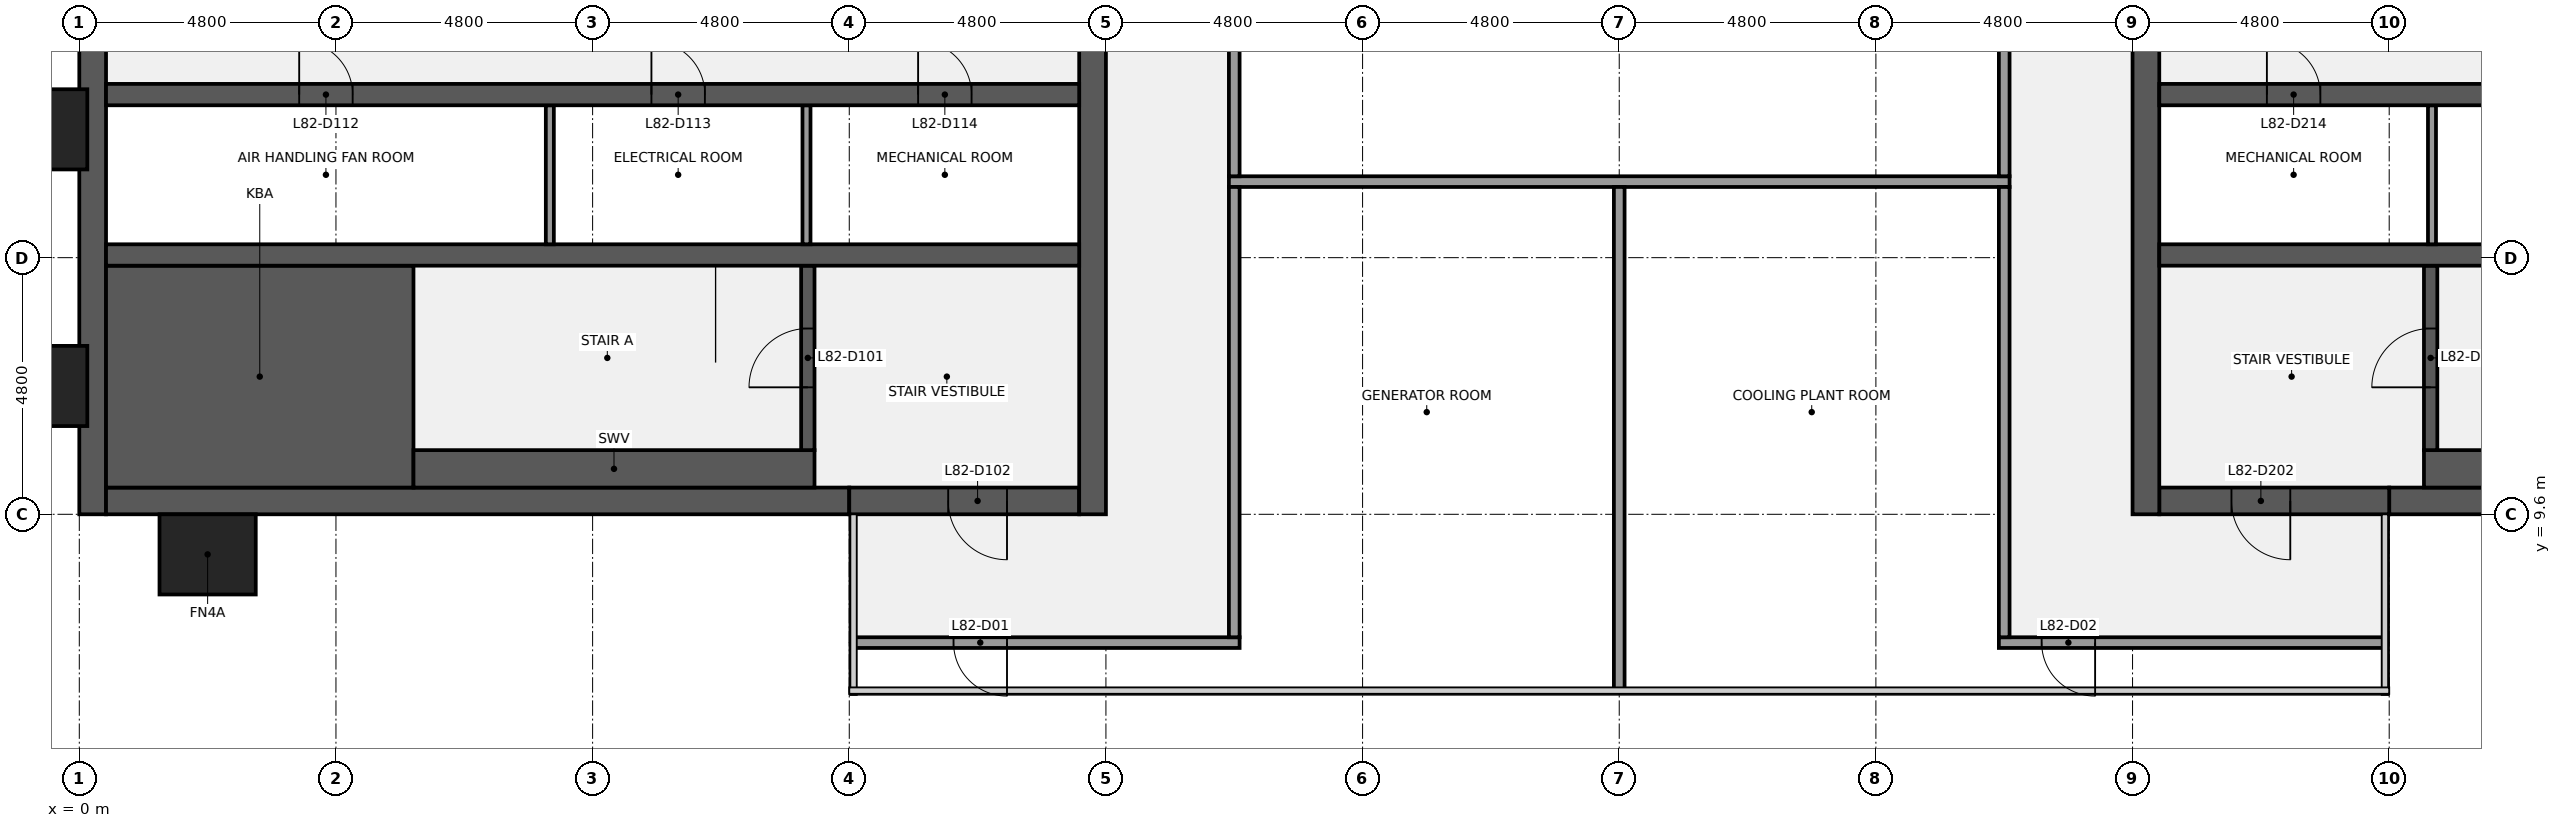
"""IFC4 building model, lengths in metres.
Left out: names, types, materials, properties, quantities, classifications, styles, units other than length and angle.
Written with IfcOpenShell. Run it as: python <this file> out.ifc"""

import sys

from ifc_helpers import new_model, si_unit, direction, frame, frame_2d, origin, origin_2d, place, context, subcontext, project, spatial, rectangle, extrude, element, fill, save


model = new_model("IFC4")
c1 = context("Model", 3, precision=1e-05, world=origin(), true_north=direction((0.0, 1.0)))
c2 = subcontext(c1, "Body", "Model", "MODEL_VIEW")
j1 = project(units=[si_unit("LENGTHUNIT", "METRE"), si_unit("PLANEANGLEUNIT", "RADIAN")], contexts=[c1])
p1 = place(None, origin())
s1 = spatial("IfcSite", under=j1, at=p1, CompositionType="ELEMENT")
p2 = place(p1, origin())
s2 = spatial("IfcBuilding", under=s1, at=p2, CompositionType="ELEMENT")
p3 = place(p2, frame((0.0, 0.0, 366.3)))
s3 = spatial("IfcBuildingStorey", under=s2, at=p3, CompositionType="ELEMENT", Elevation=366.3)
p4 = place(p3, frame((0.25, 9.6, 0.0), z_axis=(0.0, 0.0, 1.0), x_axis=(0.0, 1.0, 0.0)))
e1 = element("IfcWall", 1, at=p4, inside=s3, PredefinedType="SHEAR", context=c2, shape_type="SweptSolid", body=[
    extrude(rectangle(XDim=28.8, YDim=0.5, at=frame_2d((14.4, 0.0))), origin(), (0.0, 0.0, 1.0), 3.75),
])
p5 = place(p3, frame((14.4, 9.85, 0.0), z_axis=(0.0, 0.0, 1.0), x_axis=(-1.0, 0.0, 0.0)))
e2 = element("IfcWall", 2, at=p5, inside=s3, PredefinedType="SHEAR", context=c2, shape_type="SweptSolid", body=[
    extrude(rectangle(XDim=13.9, YDim=0.5, at=frame_2d((6.95, 0.0))), origin(), (0.0, 0.0, 1.0), 3.75),
])
p6 = place(p3, frame((18.7, 9.85, 0.0), z_axis=(0.0, 0.0, 1.0), x_axis=(-1.0, 0.0, 0.0)))
e3 = element("IfcWall", 3, at=p6, inside=s3, PredefinedType="SHEAR", context=c2, shape_type="SweptSolid", body=[
    extrude(rectangle(XDim=4.3, YDim=0.5, at=frame_2d((2.15, 0.0))), origin(), (0.0, 0.0, 1.0), 3.75),
])
p7 = place(p6, frame((1.35, 0.0, 0.0)))
e4 = element("IfcOpeningElement", 4, at=p7, cuts=e3, PredefinedType="OPENING", context=c2, shape_type="SweptSolid", body=[
    extrude(rectangle(XDim=1.1, YDim=2.1, at=frame_2d((0.55, 1.05))), frame((0.0, 0.26, 0.0), z_axis=(0.0, -1.0, 0.0), x_axis=(1.0, 0.0, 0.0)), (0.0, 0.0, 1.0), 0.52),
])
p8 = place(p3, frame((18.95, 38.4, 0.0), z_axis=(0.0, 0.0, 1.0), x_axis=(0.0, -1.0, 0.0)))
e5 = element("IfcWall", 5, at=p8, inside=s3, PredefinedType="SHEAR", context=c2, shape_type="SweptSolid", body=[
    extrude(rectangle(XDim=28.8, YDim=0.5, at=frame_2d((14.4, 0.0))), origin(), (0.0, 0.0, 1.0), 3.75),
])
p9 = place(p8, frame((18.3, 0.0, 0.0)))
e6 = element("IfcOpeningElement", 6, at=p9, cuts=e5, PredefinedType="OPENING", context=c2, shape_type="SweptSolid", body=[
    extrude(rectangle(XDim=1.8, YDim=2.1, at=frame_2d((0.9, 1.05))), frame((0.0, 0.26, 0.0), z_axis=(0.0, -1.0, 0.0), x_axis=(1.0, 0.0, 0.0)), (0.0, 0.0, 1.0), 0.52),
])
p10 = place(p8, frame((8.7, 0.0, 0.0)))
e7 = element("IfcOpeningElement", 7, at=p10, cuts=e5, PredefinedType="OPENING", context=c2, shape_type="SweptSolid", body=[
    extrude(rectangle(XDim=1.8, YDim=2.1, at=frame_2d((0.9, 1.05))), frame((0.0, 0.26, 0.0), z_axis=(0.0, -1.0, 0.0), x_axis=(1.0, 0.0, 0.0)), (0.0, 0.0, 1.0), 0.52),
])
p11 = place(p3, frame((0.5, 12.175, 0.0), z_axis=(0.0, 0.0, 1.0), x_axis=(1.0, 0.0, 0.0)))
e8 = element("IfcWall", 8, at=p11, inside=s3, PredefinedType="SHEAR", context=c2, shape_type="SweptSolid", body=[
    extrude(rectangle(XDim=5.75, YDim=4.15, at=frame_2d((2.875, 0.0))), origin(), (0.0, 0.0, 1.0), 3.75),
])
p12 = place(p3, frame((6.25, 10.45, 0.0), z_axis=(0.0, 0.0, 1.0), x_axis=(1.0, 0.0, 0.0)))
e9 = element("IfcWall", 9, at=p12, inside=s3, PredefinedType="SHEAR", context=c2, shape_type="SweptSolid", body=[
    extrude(rectangle(XDim=7.5, YDim=0.7, at=frame_2d((3.75, 0.0))), origin(), (0.0, 0.0, 1.0), 3.75),
])
p13 = place(p3, frame((13.625, 10.8, 0.0), z_axis=(0.0, 0.0, 1.0), x_axis=(0.0, 1.0, 0.0)))
e10 = element("IfcWall", 10, at=p13, inside=s3, PredefinedType="SHEAR", context=c2, shape_type="SweptSolid", body=[
    extrude(rectangle(XDim=3.45, YDim=0.25, at=frame_2d((1.725, 0.0))), origin(), (0.0, 0.0, 1.0), 3.75),
])
p14 = place(p13, frame((1.175, 0.0, 0.0)))
e11 = element("IfcOpeningElement", 11, at=p14, cuts=e10, PredefinedType="OPENING", context=c2, shape_type="SweptSolid", body=[
    extrude(rectangle(XDim=1.1, YDim=2.1, at=frame_2d((0.55, 1.05))), frame((0.0, 0.135, 0.0), z_axis=(0.0, -1.0, 0.0), x_axis=(1.0, 0.0, 0.0)), (0.0, 0.0, 1.0), 0.27),
])
p15 = place(p3, frame((0.5, 14.45, 0.0), z_axis=(0.0, 0.0, 1.0), x_axis=(1.0, 0.0, 0.0)))
e12 = element("IfcWall", 12, at=p15, inside=s3, PredefinedType="SHEAR", context=c2, shape_type="SweptSolid", body=[
    extrude(rectangle(XDim=18.2, YDim=0.4, at=frame_2d((9.1, 0.0))), origin(), (0.0, 0.0, 1.0), 3.75),
])
for number, where, z_axis, x_axis in (
    (13, (8.8, 14.65, 0.0), (0.0, 0.0, 1.0), (0.0, 1.0, 0.0)),
    (14, (13.6, 14.65, 0.0), (0.0, 0.0, 1.0), (0.0, 1.0, 0.0)),
):
    element("IfcWall", number, at=place(p3, frame(where, z_axis=z_axis, x_axis=x_axis)), inside=s3, PredefinedType="PARTITIONING", context=c2, shape_type="SweptSolid", body=[
        extrude(rectangle(XDim=2.6, YDim=0.15, at=frame_2d((1.3, 0.0))), origin(), (0.0, 0.0, 1.0), 3.75),
    ])
p16 = place(p3, frame((0.5, 17.45, 0.0), z_axis=(0.0, 0.0, 1.0), x_axis=(1.0, 0.0, 0.0)))
e15 = element("IfcWall", 15, at=p16, inside=s3, PredefinedType="SHEAR", context=c2, shape_type="SweptSolid", body=[
    extrude(rectangle(XDim=18.2, YDim=0.4, at=frame_2d((9.1, 0.0))), origin(), (0.0, 0.0, 1.0), 3.75),
])
p17 = place(p16, frame((3.613, 0.0, 0.0)))
e16 = element("IfcOpeningElement", 16, at=p17, cuts=e15, PredefinedType="OPENING", context=c2, shape_type="SweptSolid", body=[
    extrude(rectangle(XDim=1.0, YDim=2.1, at=frame_2d((0.5, 1.05))), frame((0.0, 0.21, 0.0), z_axis=(0.0, -1.0, 0.0), x_axis=(1.0, 0.0, 0.0)), (0.0, 0.0, 1.0), 0.42),
])
p18 = place(p16, frame((10.2, 0.0, 0.0)))
e17 = element("IfcOpeningElement", 17, at=p18, cuts=e15, PredefinedType="OPENING", context=c2, shape_type="SweptSolid", body=[
    extrude(rectangle(XDim=1.0, YDim=2.1, at=frame_2d((0.5, 1.05))), frame((0.0, 0.21, 0.0), z_axis=(0.0, -1.0, 0.0), x_axis=(1.0, 0.0, 0.0)), (0.0, 0.0, 1.0), 0.42),
])
p19 = place(p16, frame((15.188, 0.0, 0.0)))
e18 = element("IfcOpeningElement", 18, at=p19, cuts=e15, PredefinedType="OPENING", context=c2, shape_type="SweptSolid", body=[
    extrude(rectangle(XDim=1.0, YDim=2.1, at=frame_2d((0.5, 1.05))), frame((0.0, 0.21, 0.0), z_axis=(0.0, -1.0, 0.0), x_axis=(1.0, 0.0, 0.0)), (0.0, 0.0, 1.0), 0.42),
])
p20 = place(p3, frame((57.1, 9.85, 0.0), z_axis=(0.0, 0.0, 1.0), x_axis=(-1.0, 0.0, 0.0)))
e19 = element("IfcWall", 19, at=p20, inside=s3, PredefinedType="SHEAR", context=c2, shape_type="SweptSolid", body=[
    extrude(rectangle(XDim=13.9, YDim=0.5, at=frame_2d((6.95, 0.0))), origin(), (0.0, 0.0, 1.0), 3.75),
])
p21 = place(p3, frame((43.2, 9.85, 0.0), z_axis=(0.0, 0.0, 1.0), x_axis=(-1.0, 0.0, 0.0)))
e20 = element("IfcWall", 20, at=p21, inside=s3, PredefinedType="SHEAR", context=c2, shape_type="SweptSolid", body=[
    extrude(rectangle(XDim=4.3, YDim=0.5, at=frame_2d((2.15, 0.0))), origin(), (0.0, 0.0, 1.0), 3.75),
])
p22 = place(p21, frame((1.85, 0.0, 0.0)))
e21 = element("IfcOpeningElement", 21, at=p22, cuts=e20, PredefinedType="OPENING", context=c2, shape_type="SweptSolid", body=[
    extrude(rectangle(XDim=1.1, YDim=2.1, at=frame_2d((0.55, 1.05))), frame((0.0, 0.26, 0.0), z_axis=(0.0, -1.0, 0.0), x_axis=(1.0, 0.0, 0.0)), (0.0, 0.0, 1.0), 0.52),
])
p23 = place(p3, frame((38.65, 9.6, 0.0), z_axis=(0.0, 0.0, 1.0), x_axis=(0.0, 1.0, 0.0)))
e22 = element("IfcWall", 22, at=p23, inside=s3, PredefinedType="SHEAR", context=c2, shape_type="SweptSolid", body=[
    extrude(rectangle(XDim=28.8, YDim=0.5, at=frame_2d((14.4, 0.0))), origin(), (0.0, 0.0, 1.0), 3.75),
])
p24 = place(p23, frame((8.7, 0.0, 0.0)))
e23 = element("IfcOpeningElement", 23, at=p24, cuts=e22, PredefinedType="OPENING", context=c2, shape_type="SweptSolid", body=[
    extrude(rectangle(XDim=1.8, YDim=2.1, at=frame_2d((0.9, 1.05))), frame((0.0, 0.26, 0.0), z_axis=(0.0, -1.0, 0.0), x_axis=(1.0, 0.0, 0.0)), (0.0, 0.0, 1.0), 0.52),
])
p25 = place(p23, frame((18.3, 0.0, 0.0)))
e24 = element("IfcOpeningElement", 24, at=p25, cuts=e22, PredefinedType="OPENING", context=c2, shape_type="SweptSolid", body=[
    extrude(rectangle(XDim=1.8, YDim=2.1, at=frame_2d((0.9, 1.05))), frame((0.0, 0.26, 0.0), z_axis=(0.0, -1.0, 0.0), x_axis=(1.0, 0.0, 0.0)), (0.0, 0.0, 1.0), 0.52),
])
p26 = place(p3, frame((43.85, 10.45, 0.0), z_axis=(0.0, 0.0, 1.0), x_axis=(1.0, 0.0, 0.0)))
e25 = element("IfcWall", 25, at=p26, inside=s3, PredefinedType="SHEAR", context=c2, shape_type="SweptSolid", body=[
    extrude(rectangle(XDim=7.5, YDim=0.7, at=frame_2d((3.75, 0.0))), origin(), (0.0, 0.0, 1.0), 3.75),
])
p27 = place(p3, frame((43.975, 10.8, 0.0), z_axis=(0.0, 0.0, 1.0), x_axis=(0.0, 1.0, 0.0)))
e26 = element("IfcWall", 26, at=p27, inside=s3, PredefinedType="SHEAR", context=c2, shape_type="SweptSolid", body=[
    extrude(rectangle(XDim=3.45, YDim=0.25, at=frame_2d((1.725, 0.0))), origin(), (0.0, 0.0, 1.0), 3.75),
])
p28 = place(p27, frame((1.175, 0.0, 0.0)))
e27 = element("IfcOpeningElement", 27, at=p28, cuts=e26, PredefinedType="OPENING", context=c2, shape_type="SweptSolid", body=[
    extrude(rectangle(XDim=1.1, YDim=2.1, at=frame_2d((0.55, 1.05))), frame((0.0, 0.135, 0.0), z_axis=(0.0, -1.0, 0.0), x_axis=(1.0, 0.0, 0.0)), (0.0, 0.0, 1.0), 0.27),
])
p29 = place(p3, frame((38.9, 14.45, 0.0), z_axis=(0.0, 0.0, 1.0), x_axis=(1.0, 0.0, 0.0)))
e28 = element("IfcWall", 28, at=p29, inside=s3, PredefinedType="SHEAR", context=c2, shape_type="SweptSolid", body=[
    extrude(rectangle(XDim=18.2, YDim=0.4, at=frame_2d((9.1, 0.0))), origin(), (0.0, 0.0, 1.0), 3.75),
])
p30 = place(p3, frame((44.0, 14.65, 0.0), z_axis=(0.0, 0.0, 1.0), x_axis=(0.0, 1.0, 0.0)))
e29 = element("IfcWall", 29, at=p30, inside=s3, PredefinedType="PARTITIONING", context=c2, shape_type="SweptSolid", body=[
    extrude(rectangle(XDim=2.6, YDim=0.15, at=frame_2d((1.3, 0.0))), origin(), (0.0, 0.0, 1.0), 3.75),
])
p31 = place(p3, frame((38.9, 17.45, 0.0), z_axis=(0.0, 0.0, 1.0), x_axis=(1.0, 0.0, 0.0)))
e30 = element("IfcWall", 30, at=p31, inside=s3, PredefinedType="SHEAR", context=c2, shape_type="SweptSolid", body=[
    extrude(rectangle(XDim=18.2, YDim=0.4, at=frame_2d((9.1, 0.0))), origin(), (0.0, 0.0, 1.0), 3.75),
])
p32 = place(p31, frame((13.587, 0.0, 0.0)))
e31 = element("IfcOpeningElement", 31, at=p32, cuts=e30, PredefinedType="OPENING", context=c2, shape_type="SweptSolid", body=[
    extrude(rectangle(XDim=1.0, YDim=2.1, at=frame_2d((0.5, 1.05))), frame((0.0, 0.21, 0.0), z_axis=(0.0, -1.0, 0.0), x_axis=(1.0, 0.0, 0.0)), (0.0, 0.0, 1.0), 0.42),
])
p33 = place(p31, frame((7.0, 0.0, 0.0)))
e32 = element("IfcOpeningElement", 32, at=p33, cuts=e30, PredefinedType="OPENING", context=c2, shape_type="SweptSolid", body=[
    extrude(rectangle(XDim=1.0, YDim=2.1, at=frame_2d((0.5, 1.05))), frame((0.0, 0.21, 0.0), z_axis=(0.0, -1.0, 0.0), x_axis=(1.0, 0.0, 0.0)), (0.0, 0.0, 1.0), 0.42),
])
p34 = place(p31, frame((2.012, 0.0, 0.0)))
e33 = element("IfcOpeningElement", 33, at=p34, cuts=e30, PredefinedType="OPENING", context=c2, shape_type="SweptSolid", body=[
    extrude(rectangle(XDim=1.0, YDim=2.1, at=frame_2d((0.5, 1.05))), frame((0.0, 0.21, 0.0), z_axis=(0.0, -1.0, 0.0), x_axis=(1.0, 0.0, 0.0)), (0.0, 0.0, 1.0), 0.42),
])
p35 = place(p3, frame((14.5, 7.2, 0.0), z_axis=(0.0, 0.0, 1.0), x_axis=(1.0, 0.0, 0.0)))
e34 = element("IfcWall", 34, at=p35, inside=s3, PredefinedType="PARTITIONING", context=c2, shape_type="SweptSolid", body=[
    extrude(rectangle(XDim=7.2, YDim=0.2, at=frame_2d((3.6, 0.0))), origin(), (0.0, 0.0, 1.0), 2.759),
])
p36 = place(p35, frame((1.85, 0.0, 0.0)))
e35 = element("IfcOpeningElement", 35, at=p36, cuts=e34, PredefinedType="OPENING", context=c2, shape_type="SweptSolid", body=[
    extrude(rectangle(XDim=1.0, YDim=2.1, at=frame_2d((0.5, 1.05))), frame((0.0, 0.11, 0.0), z_axis=(0.0, -1.0, 0.0), x_axis=(1.0, 0.0, 0.0)), (0.0, 0.0, 1.0), 0.22),
])
p37 = place(p3, frame((35.9, 7.2, 0.0), z_axis=(0.0, 0.0, 1.0), x_axis=(1.0, 0.0, 0.0)))
e36 = element("IfcWall", 36, at=p37, inside=s3, PredefinedType="PARTITIONING", context=c2, shape_type="SweptSolid", body=[
    extrude(rectangle(XDim=7.2, YDim=0.2, at=frame_2d((3.6, 0.0))), origin(), (0.0, 0.0, 1.0), 2.759),
])
p38 = place(p37, frame((0.8, 0.0, 0.0)))
e37 = element("IfcOpeningElement", 37, at=p38, cuts=e36, PredefinedType="OPENING", context=c2, shape_type="SweptSolid", body=[
    extrude(rectangle(XDim=1.0, YDim=2.1, at=frame_2d((0.5, 1.05))), frame((0.0, 0.11, 0.0), z_axis=(0.0, -1.0, 0.0), x_axis=(1.0, 0.0, 0.0)), (0.0, 0.0, 1.0), 0.22),
])
p39 = place(p3, frame((21.5, 15.822, 0.0), z_axis=(0.0, 0.0, 1.0), x_axis=(1.0, 0.0, 0.0)))
e38 = element("IfcWall", 38, at=p39, inside=s3, PredefinedType="PARTITIONING", context=c2, shape_type="SweptSolid", body=[
    extrude(rectangle(XDim=14.6, YDim=0.2, at=frame_2d((7.3, 0.0))), origin(), (0.0, 0.0, 1.0), 2.759),
])
p40 = place(p3, frame((21.6, 7.3, 0.0), z_axis=(0.0, 0.0, 1.0), x_axis=(0.0, 1.0, 0.0)))
e39 = element("IfcWall", 39, at=p40, inside=s3, PredefinedType="PARTITIONING", context=c2, shape_type="SweptSolid", body=[
    extrude(rectangle(XDim=8.422, YDim=0.2, at=frame_2d((4.211, 0.0))), origin(), (0.0, 0.0, 1.0), 2.759),
])
p41 = place(p3, frame((21.6, 15.922, 0.0), z_axis=(0.0, 0.0, 1.0), x_axis=(0.0, 1.0, 0.0)))
e40 = element("IfcWall", 40, at=p41, inside=s3, PredefinedType="PARTITIONING", context=c2, shape_type="SweptSolid", body=[
    extrude(rectangle(XDim=9.4, YDim=0.2, at=frame_2d((4.7, 0.0))), origin(), (0.0, 0.0, 1.0), 2.759),
])
p42 = place(p41, frame((4.2, 0.0, 0.0)))
e41 = element("IfcOpeningElement", 41, at=p42, cuts=e40, PredefinedType="OPENING", context=c2, shape_type="SweptSolid", body=[
    extrude(rectangle(XDim=1.0, YDim=2.1, at=frame_2d((0.5, 1.05))), frame((0.0, 0.11, 0.0), z_axis=(0.0, -1.0, 0.0), x_axis=(1.0, 0.0, 0.0)), (0.0, 0.0, 1.0), 0.22),
])
p43 = place(p3, frame((28.8, 6.322, 0.0), z_axis=(0.0, 0.0, 1.0), x_axis=(0.0, 1.0, 0.0)))
e42 = element("IfcWall", 42, at=p43, inside=s3, PredefinedType="PARTITIONING", context=c2, shape_type="SweptSolid", body=[
    extrude(rectangle(XDim=9.4, YDim=0.2, at=frame_2d((4.7, 0.0))), origin(), (0.0, 0.0, 1.0), 2.759),
])
p44 = place(p3, frame((36.0, 7.3, 0.0), z_axis=(0.0, 0.0, 1.0), x_axis=(0.0, 1.0, 0.0)))
e43 = element("IfcWall", 43, at=p44, inside=s3, PredefinedType="PARTITIONING", context=c2, shape_type="SweptSolid", body=[
    extrude(rectangle(XDim=8.422, YDim=0.2, at=frame_2d((4.211, 0.0))), origin(), (0.0, 0.0, 1.0), 2.759),
])
p45 = place(p3, frame((36.0, 15.922, 0.0), z_axis=(0.0, 0.0, 1.0), x_axis=(0.0, 1.0, 0.0)))
e44 = element("IfcWall", 44, at=p45, inside=s3, PredefinedType="PARTITIONING", context=c2, shape_type="SweptSolid", body=[
    extrude(rectangle(XDim=9.4, YDim=0.2, at=frame_2d((4.7, 0.0))), origin(), (0.0, 0.0, 1.0), 2.759),
])
for number, where, z_axis, x_axis in (
    (45, (-0.75, 12.0, 0.0), (0.0, 0.0, 1.0), (0.0, 1.0, 0.0)),
    (46, (-0.75, 16.8, 0.0), (0.0, 0.0, 1.0), (0.0, 1.0, 0.0)),
    (47, (2.4, 8.85, 0.0), (0.0, 0.0, 1.0), (1.0, 0.0, 0.0)),
):
    element("IfcColumn", number, at=place(p3, frame(where, z_axis=z_axis, x_axis=x_axis)), inside=s3, PredefinedType="PILASTER", context=c2, shape_type="SweptSolid", body=[
        extrude(rectangle(XDim=1.8, YDim=1.5, at=origin_2d()), origin(), (0.0, 0.0, 1.0), 4.0),
    ])
p46 = place(p14, origin())
e48 = element("IfcDoor", 48, at=p46, inside=s3, OperationType="SINGLE_SWING_LEFT", PredefinedType="DOOR", context=c2, shape_type="SweptSolid", body=[
    extrude(rectangle(XDim=1.1, YDim=2.1, at=frame_2d((0.55, 1.05))), frame((0.0, 0.025, 0.0), z_axis=(0.0, -1.0, 0.0), x_axis=(1.0, 0.0, 0.0)), (0.0, 0.0, 1.0), 0.05),
])
fill(e11, e48)
p47 = place(p7, origin())
e49 = element("IfcDoor", 49, at=p47, inside=s3, OperationType="SINGLE_SWING_LEFT", PredefinedType="DOOR", context=c2, shape_type="SweptSolid", body=[
    extrude(rectangle(XDim=1.1, YDim=2.1, at=frame_2d((0.55, 1.05))), frame((0.0, 0.025, 0.0), z_axis=(0.0, -1.0, 0.0), x_axis=(1.0, 0.0, 0.0)), (0.0, 0.0, 1.0), 0.05),
])
fill(e4, e49)
p48 = place(p17, origin())
e50 = element("IfcDoor", 50, at=p48, inside=s3, OperationType="SINGLE_SWING_LEFT", PredefinedType="DOOR", context=c2, shape_type="SweptSolid", body=[
    extrude(rectangle(XDim=1.0, YDim=2.1, at=frame_2d((0.5, 1.05))), frame((0.0, 0.025, 0.0), z_axis=(0.0, -1.0, 0.0), x_axis=(1.0, 0.0, 0.0)), (0.0, 0.0, 1.0), 0.05),
])
fill(e16, e50)
p49 = place(p18, origin())
e51 = element("IfcDoor", 51, at=p49, inside=s3, OperationType="SINGLE_SWING_LEFT", PredefinedType="DOOR", context=c2, shape_type="SweptSolid", body=[
    extrude(rectangle(XDim=1.0, YDim=2.1, at=frame_2d((0.5, 1.05))), frame((0.0, 0.025, 0.0), z_axis=(0.0, -1.0, 0.0), x_axis=(1.0, 0.0, 0.0)), (0.0, 0.0, 1.0), 0.05),
])
fill(e17, e51)
p50 = place(p19, origin())
e52 = element("IfcDoor", 52, at=p50, inside=s3, OperationType="SINGLE_SWING_LEFT", PredefinedType="DOOR", context=c2, shape_type="SweptSolid", body=[
    extrude(rectangle(XDim=1.0, YDim=2.1, at=frame_2d((0.5, 1.05))), frame((0.0, 0.025, 0.0), z_axis=(0.0, -1.0, 0.0), x_axis=(1.0, 0.0, 0.0)), (0.0, 0.0, 1.0), 0.05),
])
fill(e18, e52)
p51 = place(p28, origin())
e53 = element("IfcDoor", 53, at=p51, inside=s3, OperationType="SINGLE_SWING_LEFT", PredefinedType="DOOR", context=c2, shape_type="SweptSolid", body=[
    extrude(rectangle(XDim=1.1, YDim=2.1, at=frame_2d((0.55, 1.05))), frame((0.0, 0.025, 0.0), z_axis=(0.0, -1.0, 0.0), x_axis=(1.0, 0.0, 0.0)), (0.0, 0.0, 1.0), 0.05),
])
fill(e27, e53)
p52 = place(p22, origin())
e54 = element("IfcDoor", 54, at=p52, inside=s3, OperationType="SINGLE_SWING_LEFT", PredefinedType="DOOR", context=c2, shape_type="SweptSolid", body=[
    extrude(rectangle(XDim=1.1, YDim=2.1, at=frame_2d((0.55, 1.05))), frame((0.0, 0.025, 0.0), z_axis=(0.0, -1.0, 0.0), x_axis=(1.0, 0.0, 0.0)), (0.0, 0.0, 1.0), 0.05),
])
fill(e21, e54)
p53 = place(p34, origin())
e55 = element("IfcDoor", 55, at=p53, inside=s3, OperationType="SINGLE_SWING_LEFT", PredefinedType="DOOR", context=c2, shape_type="SweptSolid", body=[
    extrude(rectangle(XDim=1.0, YDim=2.1, at=frame_2d((0.5, 1.05))), frame((0.0, 0.025, 0.0), z_axis=(0.0, -1.0, 0.0), x_axis=(1.0, 0.0, 0.0)), (0.0, 0.0, 1.0), 0.05),
])
fill(e33, e55)
p54 = place(p36, origin())
e56 = element("IfcDoor", 56, at=p54, inside=s3, OperationType="SINGLE_SWING_RIGHT", PredefinedType="DOOR", context=c2, shape_type="SweptSolid", body=[
    extrude(rectangle(XDim=1.0, YDim=2.1, at=frame_2d((0.5, 1.05))), frame((0.0, 0.025, 0.0), z_axis=(0.0, -1.0, 0.0), x_axis=(1.0, 0.0, 0.0)), (0.0, 0.0, 1.0), 0.05),
])
fill(e35, e56)
p55 = place(p38, origin())
e57 = element("IfcDoor", 57, at=p55, inside=s3, OperationType="SINGLE_SWING_RIGHT", PredefinedType="DOOR", context=c2, shape_type="SweptSolid", body=[
    extrude(rectangle(XDim=1.0, YDim=2.1, at=frame_2d((0.5, 1.05))), frame((0.0, 0.025, 0.0), z_axis=(0.0, -1.0, 0.0), x_axis=(1.0, 0.0, 0.0)), (0.0, 0.0, 1.0), 0.05),
])
fill(e37, e57)
save(model, sys.argv[1])
